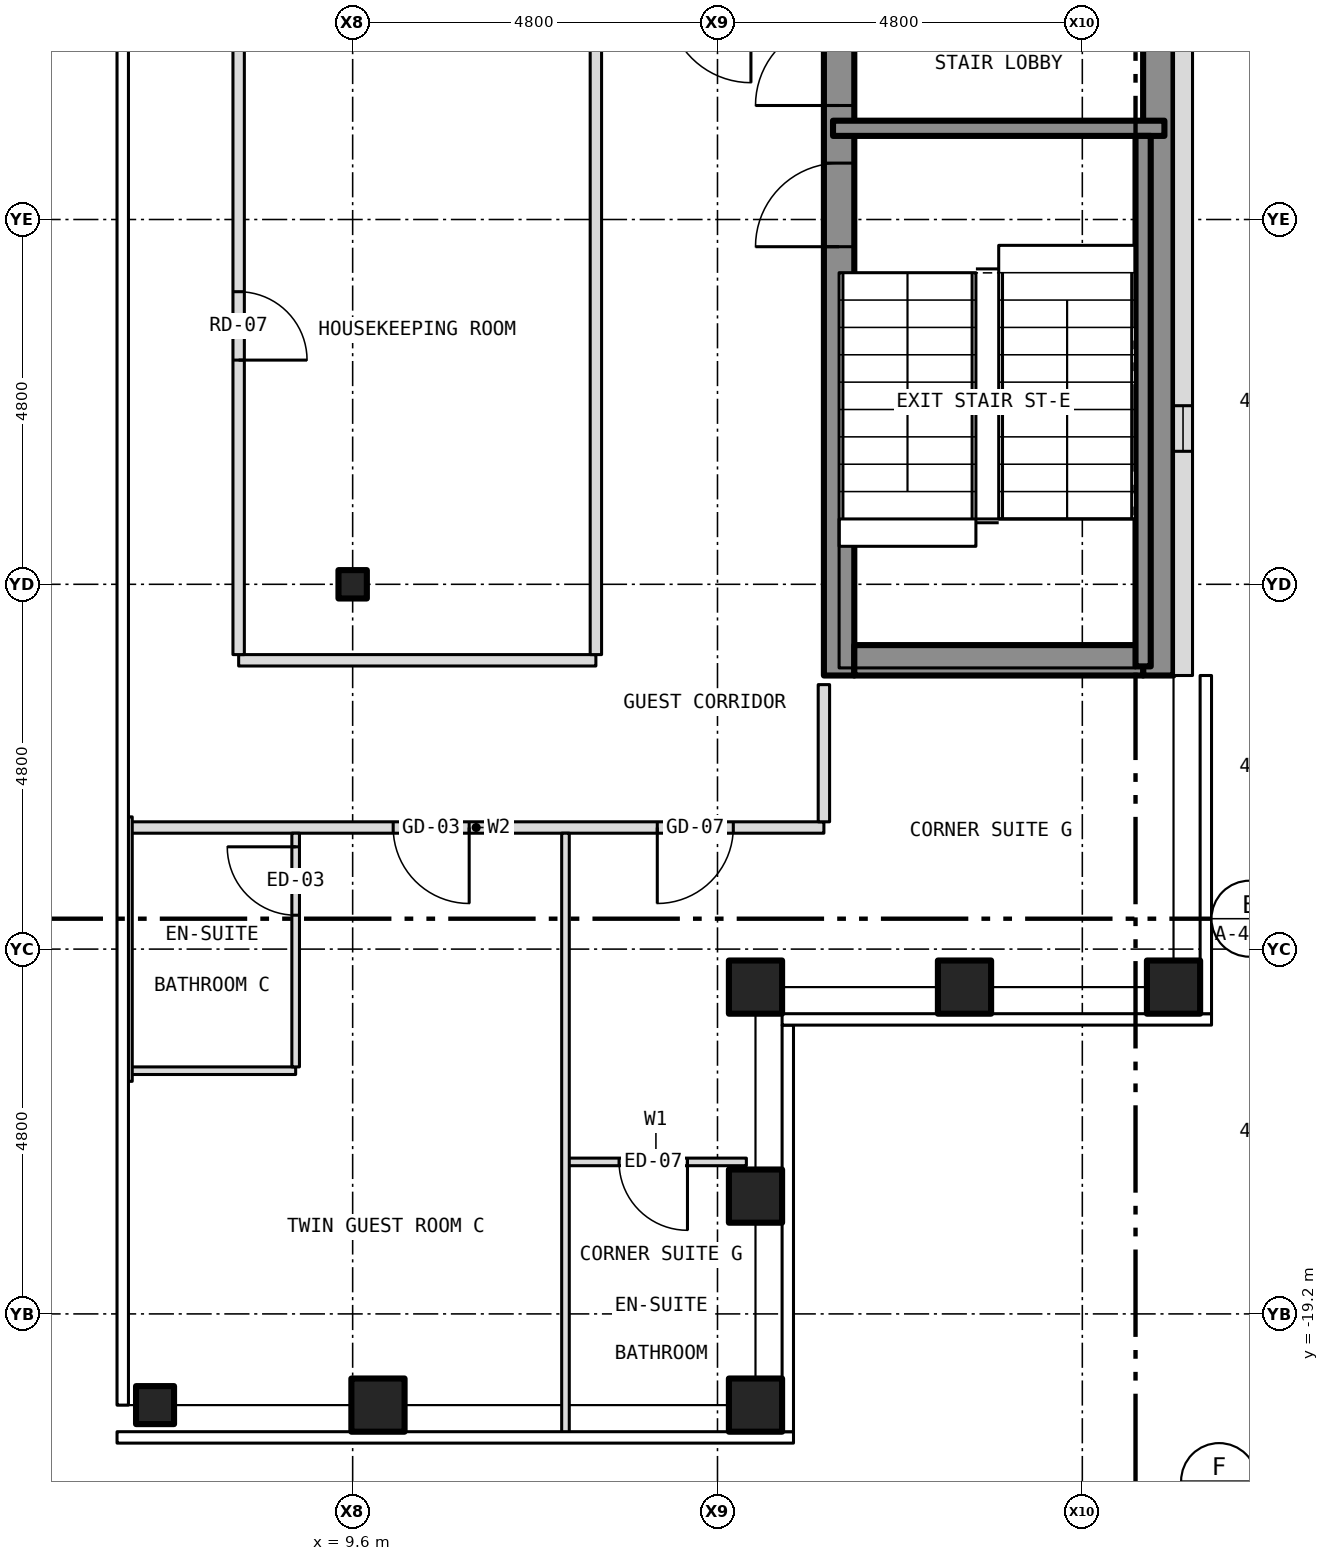
"""IFC4 building model, lengths in metres.
Left out: names, types, materials, properties, quantities, classifications, styles, units other than length and angle.
Written with IfcOpenShell. Run it as: python <this file> out.ifc"""

import sys

from ifc_helpers import new_model, si_unit, direction, frame, frame_2d, origin, origin_2d, place, context, subcontext, project, spatial, rectangle, hollow_rectangle, i_section, extrude, element, fill, save


model = new_model("IFC4")
c1 = context("Model", 3, precision=1e-05, world=origin(), true_north=direction((0.0, 1.0)))
c2 = subcontext(c1, "Body", "Model", "MODEL_VIEW")
j1 = project(units=[si_unit("LENGTHUNIT", "METRE"), si_unit("PLANEANGLEUNIT", "RADIAN")], contexts=[c1])
p1 = place(None, origin())
s1 = spatial("IfcSite", under=j1, at=p1, CompositionType="ELEMENT")
p2 = place(p1, origin())
s2 = spatial("IfcBuilding", under=s1, at=p2, CompositionType="ELEMENT")
p3 = place(p2, frame((0.0, 0.0, 222.5)))
s3 = spatial("IfcBuildingStorey", under=s2, at=p3, CompositionType="ELEMENT", Elevation=222.5)
for number, where, z_axis, x_axis in (
    (1, (9.933, -20.4, -0.15), (0.0, 0.0, 1.0), (1.0, 0.0, 0.0)),
    (2, (14.9, -20.4, -0.15), (0.0, 0.0, 1.0), (1.0, 0.0, 0.0)),
    (3, (20.4, -14.9, -0.15), (0.0, 0.0, 1.0), (1.0, 0.0, 0.0)),
    (4, (14.9, -14.9, -0.15), (0.0, 0.0, 1.0), (1.0, 0.0, 0.0)),
    (5, (14.9, -17.65, -0.15), (0.0, 0.0, 1.0), (1.0, 0.0, 0.0)),
    (6, (17.65, -14.9, -0.15), (0.0, 0.0, 1.0), (1.0, 0.0, 0.0)),
):
    element("IfcColumn", number, at=place(p3, frame(where, z_axis=z_axis, x_axis=x_axis)), inside=s3, PredefinedType="COLUMN", context=c2, shape_type="SweptSolid", body=[
        extrude(hollow_rectangle(XDim=0.7, YDim=0.7, WallThickness=0.04, at=origin_2d()), origin(), (0.0, 0.0, 1.0), 3.5),
    ])
p4 = place(p3, frame((7.0, -20.4, -0.15), z_axis=(0.0, 0.0, 1.0), x_axis=(1.0, 0.0, 0.0)))
e7 = element("IfcColumn", 7, at=p4, inside=s3, PredefinedType="COLUMN", context=c2, shape_type="SweptSolid", body=[
    extrude(hollow_rectangle(XDim=0.5, YDim=0.5, WallThickness=0.03, at=origin_2d()), origin(), (0.0, 0.0, 1.0), 3.5),
])
p5 = place(p3, frame((9.6, -9.6, -0.15), z_axis=(0.0, 0.0, 1.0), x_axis=(1.0, 0.0, 0.0)))
e8 = element("IfcColumn", 8, at=p5, inside=s3, PredefinedType="COLUMN", context=c2, shape_type="SweptSolid", body=[
    extrude(i_section(OverallWidth=0.373, OverallDepth=0.373, WebThickness=0.016, FlangeThickness=0.026, at=origin_2d()), origin(), (0.0, 0.0, 1.0), 3.5),
])
p6 = place(p3, frame((16.0, -10.8, 0.0), z_axis=(0.0, 0.0, 1.0), x_axis=(0.0, 1.0, 0.0)))
e9 = element("IfcWall", 9, at=p6, inside=s3, PredefinedType="SHEAR", context=c2, shape_type="SweptSolid", body=[
    extrude(rectangle(XDim=21.6, YDim=0.4, at=frame_2d((10.8, 0.0))), origin(), (0.0, 0.0, 1.0), 3.25),
])
p7 = place(p6, frame((9.4, 0.0, 0.0)))
e10 = element("IfcOpeningElement", 10, at=p7, cuts=e9, PredefinedType="OPENING", context=c2, shape_type="SweptSolid", body=[
    extrude(rectangle(XDim=1.1, YDim=2.1, at=frame_2d((0.55, 1.05))), frame((0.0, 0.212, 0.0), z_axis=(0.0, -1.0, 0.0), x_axis=(1.0, 0.0, 0.0)), (0.0, 0.0, 1.0), 0.424),
])
p8 = place(p6, frame((11.5, 0.0, 0.0)))
e11 = element("IfcOpeningElement", 11, at=p8, cuts=e9, PredefinedType="OPENING", context=c2, shape_type="SweptSolid", body=[
    extrude(rectangle(XDim=1.1, YDim=2.1, at=frame_2d((0.55, 1.05))), frame((0.0, 0.212, 0.0), z_axis=(0.0, -1.0, 0.0), x_axis=(1.0, 0.0, 0.0)), (0.0, 0.0, 1.0), 0.424),
])
p9 = place(p6, frame((13.6, 0.0, 0.0)))
e12 = element("IfcOpeningElement", 12, at=p9, cuts=e9, PredefinedType="OPENING", context=c2, shape_type="SweptSolid", body=[
    extrude(rectangle(XDim=1.1, YDim=2.1, at=frame_2d((0.55, 1.05))), frame((0.0, 0.212, 0.0), z_axis=(0.0, -1.0, 0.0), x_axis=(1.0, 0.0, 0.0)), (0.0, 0.0, 1.0), 0.424),
])
p10 = place(p6, frame((15.7, 0.0, 0.0)))
e13 = element("IfcOpeningElement", 13, at=p10, cuts=e9, PredefinedType="OPENING", context=c2, shape_type="SweptSolid", body=[
    extrude(rectangle(XDim=1.1, YDim=2.1, at=frame_2d((0.55, 1.05))), frame((0.0, 0.212, 0.0), z_axis=(0.0, -1.0, 0.0), x_axis=(1.0, 0.0, 0.0)), (0.0, 0.0, 1.0), 0.424),
])
p11 = place(p6, frame((17.8, 0.0, 0.0)))
e14 = element("IfcOpeningElement", 14, at=p11, cuts=e9, PredefinedType="OPENING", context=c2, shape_type="SweptSolid", body=[
    extrude(rectangle(XDim=1.1, YDim=2.1, at=frame_2d((0.55, 1.05))), frame((0.0, 0.212, 0.0), z_axis=(0.0, -1.0, 0.0), x_axis=(1.0, 0.0, 0.0)), (0.0, 0.0, 1.0), 0.424),
])
p12 = place(p6, frame((5.642, 0.0, 0.0)))
e15 = element("IfcOpeningElement", 15, at=p12, cuts=e9, PredefinedType="OPENING", context=c2, shape_type="SweptSolid", body=[
    extrude(rectangle(XDim=1.1, YDim=2.1, at=frame_2d((0.55, 1.05))), frame((0.0, 0.212, 0.0), z_axis=(0.0, -1.0, 0.0), x_axis=(1.0, 0.0, 0.0)), (0.0, 0.0, 1.0), 0.424),
])
p13 = place(p6, frame((7.5, 0.0, 0.0)))
e16 = element("IfcOpeningElement", 16, at=p13, cuts=e9, PredefinedType="OPENING", context=c2, shape_type="SweptSolid", body=[
    extrude(rectangle(XDim=1.1, YDim=2.1, at=frame_2d((0.55, 1.05))), frame((0.0, 0.212, 0.0), z_axis=(0.0, -1.0, 0.0), x_axis=(1.0, 0.0, 0.0)), (0.0, 0.0, 1.0), 0.424),
])
p14 = place(p6, frame((20.0, 0.0, 0.0)))
e17 = element("IfcOpeningElement", 17, at=p14, cuts=e9, PredefinedType="OPENING", context=c2, shape_type="SweptSolid", body=[
    extrude(rectangle(XDim=0.9, YDim=2.1, at=frame_2d((0.45, 1.05))), frame((0.0, 0.212, 0.0), z_axis=(0.0, -1.0, 0.0), x_axis=(1.0, 0.0, 0.0)), (0.0, 0.0, 1.0), 0.424),
])
p15 = place(p3, frame((20.2, -10.8, 0.0), z_axis=(0.0, 0.0, 1.0), x_axis=(0.0, 1.0, 0.0)))
e18 = element("IfcWall", 18, at=p15, inside=s3, PredefinedType="SHEAR", context=c2, shape_type="SweptSolid", body=[
    extrude(rectangle(XDim=21.6, YDim=0.4, at=frame_2d((10.8, 0.0))), origin(), (0.0, 0.0, 1.0), 3.25),
])
p16 = place(p3, frame((16.2, -10.6, 0.0), z_axis=(0.0, 0.0, 1.0), x_axis=(1.0, 0.0, 0.0)))
e19 = element("IfcWall", 19, at=p16, inside=s3, PredefinedType="SHEAR", context=c2, shape_type="SweptSolid", body=[
    extrude(rectangle(XDim=3.8, YDim=0.4, at=frame_2d((1.9, 0.0))), origin(), (0.0, 0.0, 1.0), 3.25),
])
p17 = place(p3, frame((20.525, -10.8, 0.0), z_axis=(0.0, 0.0, 1.0), x_axis=(0.0, 1.0, 0.0)))
e20 = element("IfcWall", 20, at=p17, inside=s3, PredefinedType="SOLIDWALL", context=c2, shape_type="SweptSolid", body=[
    extrude(rectangle(XDim=21.6, YDim=0.25, at=frame_2d((10.8, 0.0))), origin(), (0.0, 0.0, 1.0), 3.5),
])
p18 = place(p17, frame((2.95, 0.0, 1.0)))
e21 = element("IfcOpeningElement", 21, at=p18, cuts=e20, PredefinedType="OPENING", context=c2, shape_type="SweptSolid", body=[
    extrude(rectangle(XDim=0.6, YDim=1.5, at=frame_2d((0.3, 0.75))), frame((0.0, 0.137, 0.0), z_axis=(0.0, -1.0, 0.0), x_axis=(1.0, 0.0, 0.0)), (0.0, 0.0, 1.0), 0.274),
])
p19 = place(p3, frame((12.4, -17.2, 0.0), z_axis=(0.0, 0.0, 1.0), x_axis=(1.0, 0.0, 0.0)))
e22 = element("IfcWall", 22, at=p19, inside=s3, PredefinedType="PARTITIONING", context=c2, shape_type="SweptSolid", body=[
    extrude(rectangle(XDim=2.38, YDim=0.1, at=frame_2d((1.19, 0.0))), origin(), (0.0, 0.0, 1.0), 3.35),
])
p20 = place(p19, frame((0.705, 0.0, 0.0)))
e23 = element("IfcOpeningElement", 23, at=p20, cuts=e22, PredefinedType="OPENING", context=c2, shape_type="SweptSolid", body=[
    extrude(rectangle(XDim=0.9, YDim=2.1, at=frame_2d((0.45, 1.05))), frame((0.0, 0.062, 0.0), z_axis=(0.0, -1.0, 0.0), x_axis=(1.0, 0.0, 0.0)), (0.0, 0.0, 1.0), 0.124),
])
p21 = place(p3, frame((6.65, -16.0, 0.0), z_axis=(0.0, 0.0, 1.0), x_axis=(1.0, 0.0, 0.0)))
e24 = element("IfcWall", 24, at=p21, inside=s3, PredefinedType="PARTITIONING", context=c2, shape_type="SweptSolid", body=[
    extrude(rectangle(XDim=2.2, YDim=0.1, at=frame_2d((1.1, 0.0))), origin(), (0.0, 0.0, 1.0), 3.35),
])
p22 = place(p3, frame((6.65, -12.8, 0.0), z_axis=(0.0, 0.0, 1.0), x_axis=(1.0, 0.0, 0.0)))
e25 = element("IfcWall", 25, at=p22, inside=s3, PredefinedType="PARTITIONING", context=c2, shape_type="SweptSolid", body=[
    extrude(rectangle(XDim=9.15, YDim=0.15, at=frame_2d((4.575, 0.0))), origin(), (0.0, 0.0, 1.0), 3.35),
])
p23 = place(p22, frame((3.483, 0.0, 0.0)))
e26 = element("IfcOpeningElement", 26, at=p23, cuts=e25, PredefinedType="OPENING", context=c2, shape_type="SweptSolid", body=[
    extrude(rectangle(XDim=1.0, YDim=2.1, at=frame_2d((0.5, 1.05))), frame((0.0, 0.087, 0.0), z_axis=(0.0, -1.0, 0.0), x_axis=(1.0, 0.0, 0.0)), (0.0, 0.0, 1.0), 0.174),
])
p24 = place(p22, frame((6.958, 0.0, 0.0)))
e27 = element("IfcOpeningElement", 27, at=p24, cuts=e25, PredefinedType="OPENING", context=c2, shape_type="SweptSolid", body=[
    extrude(rectangle(XDim=1.0, YDim=2.1, at=frame_2d((0.5, 1.05))), frame((0.0, 0.087, 0.0), z_axis=(0.0, -1.0, 0.0), x_axis=(1.0, 0.0, 0.0)), (0.0, 0.0, 1.0), 0.174),
])
p25 = place(p3, frame((8.1, -10.6, 0.0), z_axis=(0.0, 0.0, 1.0), x_axis=(1.0, 0.0, 0.0)))
e28 = element("IfcWall", 28, at=p25, inside=s3, PredefinedType="PARTITIONING", context=c2, shape_type="SweptSolid", body=[
    extrude(rectangle(XDim=4.7, YDim=0.15, at=frame_2d((2.35, 0.0))), origin(), (0.0, 0.0, 1.0), 3.35),
])
p26 = place(p3, frame((15.92, -3.6, 0.0), z_axis=(0.0, 0.0, 1.0), x_axis=(1.0, 0.0, 0.0)))
e29 = element("IfcWall", 29, at=p26, inside=s3, PredefinedType="SHEAR", context=c2, shape_type="SweptSolid", body=[
    extrude(rectangle(XDim=4.36, YDim=0.2, at=frame_2d((2.18, 0.0))), origin(), (0.0, 0.0, 1.0), 3.25),
])
p27 = place(p3, frame((6.65, -16.14, 0.0), z_axis=(0.0, 0.0, 1.0), x_axis=(0.0, 1.0, 0.0)))
e30 = element("IfcWall", 30, at=p27, inside=s3, PredefinedType="PARTITIONING", context=c2, shape_type="SweptSolid", body=[
    extrude(rectangle(XDim=3.48, YDim=0.1, at=frame_2d((1.74, 0.0))), origin(), (0.0, 0.0, 1.0), 3.35),
])
p28 = place(p3, frame((8.1, -10.525, 0.0), z_axis=(0.0, 0.0, 1.0), x_axis=(0.0, 1.0, 0.0)))
e31 = element("IfcWall", 31, at=p28, inside=s3, PredefinedType="PARTITIONING", context=c2, shape_type="SweptSolid", body=[
    extrude(rectangle(XDim=8.65, YDim=0.15, at=frame_2d((4.325, 0.0))), origin(), (0.0, 0.0, 1.0), 3.35),
])
p29 = place(p28, frame((3.875, 0.0, 0.0)))
e32 = element("IfcOpeningElement", 32, at=p29, cuts=e31, PredefinedType="OPENING", context=c2, shape_type="SweptSolid", body=[
    extrude(rectangle(XDim=0.9, YDim=2.1, at=frame_2d((0.45, 1.05))), frame((0.0, 0.087, 0.0), z_axis=(0.0, -1.0, 0.0), x_axis=(1.0, 0.0, 0.0)), (0.0, 0.0, 1.0), 0.174),
])
p30 = place(p3, frame((8.85, -15.95, 0.0), z_axis=(0.0, 0.0, 1.0), x_axis=(0.0, 1.0, 0.0)))
e33 = element("IfcWall", 33, at=p30, inside=s3, PredefinedType="PARTITIONING", context=c2, shape_type="SweptSolid", body=[
    extrude(rectangle(XDim=3.075, YDim=0.1, at=frame_2d((1.538, 0.0))), origin(), (0.0, 0.0, 1.0), 3.35),
])
p31 = place(p30, frame((1.996, 0.0, 0.0)))
e34 = element("IfcOpeningElement", 34, at=p31, cuts=e33, PredefinedType="OPENING", context=c2, shape_type="SweptSolid", body=[
    extrude(rectangle(XDim=0.9, YDim=2.1, at=frame_2d((0.45, 1.05))), frame((0.0, 0.062, 0.0), z_axis=(0.0, -1.0, 0.0), x_axis=(1.0, 0.0, 0.0)), (0.0, 0.0, 1.0), 0.124),
])
p32 = place(p3, frame((12.4, -20.78, 0.0), z_axis=(0.0, 0.0, 1.0), x_axis=(0.0, 1.0, 0.0)))
e35 = element("IfcWall", 35, at=p32, inside=s3, PredefinedType="PARTITIONING", context=c2, shape_type="SweptSolid", body=[
    extrude(rectangle(XDim=7.905, YDim=0.1, at=frame_2d((3.953, 0.0))), origin(), (0.0, 0.0, 1.0), 3.35),
])
p33 = place(p3, frame((12.8, -10.525, 0.0), z_axis=(0.0, 0.0, 1.0), x_axis=(0.0, 1.0, 0.0)))
e36 = element("IfcWall", 36, at=p33, inside=s3, PredefinedType="PARTITIONING", context=c2, shape_type="SweptSolid", body=[
    extrude(rectangle(XDim=8.525, YDim=0.15, at=frame_2d((4.262, 0.0))), origin(), (0.0, 0.0, 1.0), 3.35),
])
p34 = place(p3, frame((15.8, -12.725, 0.0), z_axis=(0.0, 0.0, 1.0), x_axis=(0.0, 1.0, 0.0)))
e37 = element("IfcWall", 37, at=p34, inside=s3, PredefinedType="PARTITIONING", context=c2, shape_type="SweptSolid", body=[
    extrude(rectangle(XDim=1.805, YDim=0.15, at=frame_2d((0.903, 0.0))), origin(), (0.0, 0.0, 1.0), 3.35),
])
p35 = place(p3, frame((20.0, -10.68, 0.0), z_axis=(0.0, 0.0, 1.0), x_axis=(0.0, 1.0, 0.0)))
e38 = element("IfcWall", 38, at=p35, inside=s3, PredefinedType="SHEAR", context=c2, shape_type="SweptSolid", body=[
    extrude(rectangle(XDim=6.98, YDim=0.2, at=frame_2d((3.49, 0.0))), origin(), (0.0, 0.0, 1.0), 3.25),
])
p36 = place(p18, origin())
e39 = element("IfcWindow", 39, at=p36, inside=s3, PartitioningType="SINGLE_PANEL", PredefinedType="WINDOW", context=c2, shape_type="SweptSolid", body=[
    extrude(rectangle(XDim=0.6, YDim=1.5, at=frame_2d((0.3, 0.75))), frame((0.0, -0.035, 0.0), z_axis=(0.0, -1.0, 0.0), x_axis=(1.0, 0.0, 0.0)), (0.0, 0.0, 1.0), 0.06),
])
fill(e21, e39)
p37 = place(p12, origin())
e40 = element("IfcDoor", 40, at=p37, inside=s3, OperationType="SINGLE_SWING_LEFT", PredefinedType="DOOR", context=c2, shape_type="SweptSolid", body=[
    extrude(rectangle(XDim=1.1, YDim=2.1, at=frame_2d((0.55, 1.05))), frame((0.0, 0.025, 0.0), z_axis=(0.0, -1.0, 0.0), x_axis=(1.0, 0.0, 0.0)), (0.0, 0.0, 1.0), 0.05),
])
fill(e15, e40)
p38 = place(p13, origin())
e41 = element("IfcDoor", 41, at=p38, inside=s3, OperationType="SINGLE_SWING_LEFT", PredefinedType="DOOR", context=c2, shape_type="SweptSolid", body=[
    extrude(rectangle(XDim=1.1, YDim=2.1, at=frame_2d((0.55, 1.05))), frame((0.0, 0.025, 0.0), z_axis=(0.0, -1.0, 0.0), x_axis=(1.0, 0.0, 0.0)), (0.0, 0.0, 1.0), 0.05),
])
fill(e16, e41)
p39 = place(p23, origin())
e42 = element("IfcDoor", 42, at=p39, inside=s3, OperationType="SINGLE_SWING_RIGHT", PredefinedType="DOOR", context=c2, shape_type="SweptSolid", body=[
    extrude(rectangle(XDim=1.0, YDim=2.1, at=frame_2d((0.5, 1.05))), frame((0.0, 0.025, 0.0), z_axis=(0.0, -1.0, 0.0), x_axis=(1.0, 0.0, 0.0)), (0.0, 0.0, 1.0), 0.05),
])
fill(e26, e42)
p40 = place(p31, origin())
e43 = element("IfcDoor", 43, at=p40, inside=s3, OperationType="SINGLE_SWING_RIGHT", PredefinedType="DOOR", context=c2, shape_type="SweptSolid", body=[
    extrude(rectangle(XDim=0.9, YDim=2.1, at=frame_2d((0.45, 1.05))), frame((0.0, 0.025, 0.0), z_axis=(0.0, -1.0, 0.0), x_axis=(1.0, 0.0, 0.0)), (0.0, 0.0, 1.0), 0.05),
])
fill(e34, e43)
p41 = place(p20, origin())
e44 = element("IfcDoor", 44, at=p41, inside=s3, OperationType="SINGLE_SWING_RIGHT", PredefinedType="DOOR", context=c2, shape_type="SweptSolid", body=[
    extrude(rectangle(XDim=0.9, YDim=2.1, at=frame_2d((0.45, 1.05))), frame((0.0, 0.025, 0.0), z_axis=(0.0, -1.0, 0.0), x_axis=(1.0, 0.0, 0.0)), (0.0, 0.0, 1.0), 0.05),
])
fill(e23, e44)
p42 = place(p24, origin())
e45 = element("IfcDoor", 45, at=p42, inside=s3, OperationType="SINGLE_SWING_LEFT", PredefinedType="DOOR", context=c2, shape_type="SweptSolid", body=[
    extrude(rectangle(XDim=1.0, YDim=2.1, at=frame_2d((0.5, 1.05))), frame((0.0, 0.025, 0.0), z_axis=(0.0, -1.0, 0.0), x_axis=(1.0, 0.0, 0.0)), (0.0, 0.0, 1.0), 0.05),
])
fill(e27, e45)
p43 = place(p29, origin())
e46 = element("IfcDoor", 46, at=p43, inside=s3, OperationType="SINGLE_SWING_LEFT", PredefinedType="DOOR", context=c2, shape_type="SweptSolid", body=[
    extrude(rectangle(XDim=0.9, YDim=2.1, at=frame_2d((0.45, 1.05))), frame((0.0, 0.025, 0.0), z_axis=(0.0, -1.0, 0.0), x_axis=(1.0, 0.0, 0.0)), (0.0, 0.0, 1.0), 0.05),
])
fill(e32, e46)
save(model, sys.argv[1])
